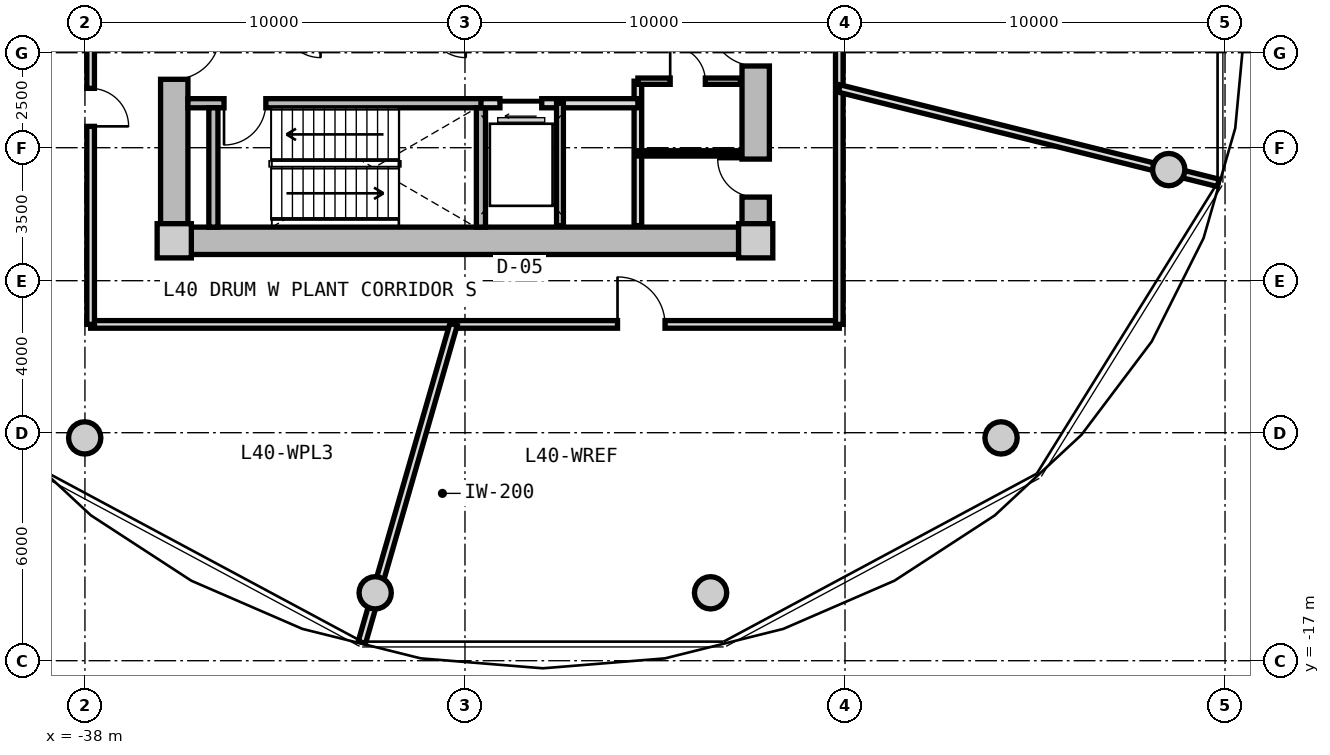
"""IFC4 building model, lengths in metres.
Left out: names, types, materials, properties, quantities, classifications, styles, units other than length and angle.
Written with IfcOpenShell. Run it as: python <this file> out.ifc"""

import sys

from ifc_helpers import new_model, si_unit, direction, frame, frame_2d, origin, origin_2d, place, context, subcontext, project, spatial, rectangle, circle, extrude, source, transform, mapped, element, fill, save


model = new_model("IFC4")
c1 = context("Model", 3, precision=1e-05, world=origin(), true_north=direction((0.0, 1.0)))
c2 = subcontext(c1, "Body", "Model", "MODEL_VIEW")
j1 = project(units=[si_unit("LENGTHUNIT", "METRE"), si_unit("PLANEANGLEUNIT", "RADIAN")], contexts=[c1])
p1 = place(None, origin())
s1 = spatial("IfcSite", under=j1, at=p1, CompositionType="ELEMENT")
p2 = place(p1, origin())
s2 = spatial("IfcBuilding", under=s1, at=p2, CompositionType="ELEMENT")
p3 = place(p2, frame((0.0, 0.0, 129.8)))
s3 = spatial("IfcBuildingStorey", under=s2, at=p3, CompositionType="ELEMENT", Elevation=129.8)
m1 = source(origin(), c2, "Body", "SweptSolid", [
    extrude(rectangle(XDim=0.9, YDim=0.9, at=origin_2d()), origin(), (0.0, 0.0, 1.0), 4.5),
])
for number, where, z_axis, x_axis in (
    (1, (-35.65, -5.95, 0.0), (0.0, 0.0, 1.0), (1.0, 0.0, 0.0)),
    (2, (-20.35, -5.95, 0.0), (0.0, 0.0, 1.0), (1.0, 0.0, 0.0)),
):
    element("IfcColumn", number, at=place(p3, frame(where, z_axis=z_axis, x_axis=x_axis)), inside=s3, PredefinedType="COLUMN", context=c2, shape_type="MappedRepresentation", body=[
        mapped(m1, transform((0.0, 0.0, 0.0), x_axis=(1.0, 0.0, 0.0), y_axis=(0.0, 1.0, 0.0), z_axis=(0.0, 0.0, 1.0), scale=1.0)),
    ])
m2 = source(origin(), c2, "Body", "SweptSolid", [
    extrude(rectangle(XDim=14.4, YDim=0.72, at=frame_2d((7.2, 0.0))), origin(), (0.0, 0.0, 1.0), 4.08),
])
p4 = place(p3, frame((-20.8, -5.95, 0.0), z_axis=(0.0, 0.0, 1.0), x_axis=(-1.0, 0.0, 0.0)))
e3 = element("IfcWall", 3, at=p4, inside=s3, PredefinedType="SHEAR", context=c2, shape_type="MappedRepresentation", body=[
    mapped(m2, transform((0.0, 0.0, 0.0), x_axis=(1.0, 0.0, 0.0), y_axis=(0.0, 1.0, 0.0), z_axis=(0.0, 0.0, 1.0), scale=1.0)),
])
m3 = source(origin(), c2, "Body", "SweptSolid", [
    extrude(rectangle(XDim=11.0, YDim=0.72, at=frame_2d((5.5, 0.0))), origin(), (0.0, 0.0, 1.0), 4.08),
])
p5 = place(p3, frame((-35.65, -5.5, 0.0), z_axis=(0.0, 0.0, 1.0), x_axis=(0.0, 1.0, 0.0)))
e4 = element("IfcWall", 4, at=p5, inside=s3, PredefinedType="SHEAR", context=c2, shape_type="MappedRepresentation", body=[
    mapped(m3, transform((0.0, 0.0, 0.0), x_axis=(1.0, 0.0, 0.0), y_axis=(0.0, 1.0, 0.0), z_axis=(0.0, 0.0, 1.0), scale=1.0)),
])
p6 = place(p5, frame((3.8, 0.0, 0.0)))
e5 = element("IfcOpeningElement", 5, at=p6, cuts=e4, PredefinedType="OPENING", context=c2, shape_type="SweptSolid", body=[
    extrude(rectangle(XDim=1.2, YDim=2.15, at=frame_2d((0.6, 1.075))), frame((0.0, 0.37, 0.0), z_axis=(0.0, -1.0, 0.0), x_axis=(1.0, 0.0, 0.0)), (0.0, 0.0, 1.0), 0.74),
])
p7 = place(p3, frame((-20.35, 5.5, 0.0), z_axis=(0.0, 0.0, 1.0), x_axis=(0.0, -1.0, 0.0)))
e6 = element("IfcWall", 6, at=p7, inside=s3, PredefinedType="SHEAR", context=c2, shape_type="MappedRepresentation", body=[
    mapped(m3, transform((0.0, 0.0, 0.0), x_axis=(1.0, 0.0, 0.0), y_axis=(0.0, 1.0, 0.0), z_axis=(0.0, 0.0, 1.0), scale=1.0)),
])
p8 = place(p7, frame((5.65, 0.0, 0.0)))
e7 = element("IfcOpeningElement", 7, at=p8, cuts=e6, PredefinedType="OPENING", context=c2, shape_type="SweptSolid", body=[
    extrude(rectangle(XDim=1.2, YDim=2.15, at=frame_2d((0.6, 1.075))), frame((0.0, 0.37, 0.0), z_axis=(0.0, -1.0, 0.0), x_axis=(1.0, 0.0, 0.0)), (0.0, 0.0, 1.0), 0.74),
])
p9 = place(p7, frame((9.3, 0.0, 0.0)))
e8 = element("IfcOpeningElement", 8, at=p9, cuts=e6, PredefinedType="OPENING", context=c2, shape_type="SweptSolid", body=[
    extrude(rectangle(XDim=1.0, YDim=2.1, at=frame_2d((0.5, 1.05))), frame((0.0, 0.37, 0.0), z_axis=(0.0, -1.0, 0.0), x_axis=(1.0, 0.0, 0.0)), (0.0, 0.0, 1.0), 0.74),
])
m4 = source(origin(), c2, "Body", "SweptSolid", [
    extrude(circle(Radius=0.425, at=origin_2d()), origin(), (0.0, 0.0, 1.0), 4.08),
])
for number, where, z_axis, x_axis in (
    (9, (-38.006, -11.137, 0.0), (0.0, 0.0, 1.0), (1.0, 0.0, 0.0)),
    (10, (-30.363, -15.213, 0.0), (0.0, 0.0, 1.0), (1.0, 0.0, 0.0)),
    (11, (-21.537, -15.213, 0.0), (0.0, 0.0, 1.0), (1.0, 0.0, 0.0)),
    (12, (-13.894, -11.137, 0.0), (0.0, 0.0, 1.0), (1.0, 0.0, 0.0)),
    (13, (-9.481, -4.076, 0.0), (0.0, 0.0, 1.0), (1.0, 0.0, 0.0)),
):
    element("IfcColumn", number, at=place(p3, frame(where, z_axis=z_axis, x_axis=x_axis)), inside=s3, PredefinedType="COLUMN", context=c2, shape_type="MappedRepresentation", body=[
        mapped(m4, transform((0.0, 0.0, 0.0), x_axis=(1.0, 0.0, 0.0), y_axis=(0.0, 1.0, 0.0), z_axis=(0.0, 0.0, 1.0), scale=1.0)),
    ])
m5 = source(origin(), c2, "Body", "SweptSolid", [
    extrude(rectangle(XDim=7.83, YDim=0.24, at=frame_2d((3.915, 0.0))), origin(), (0.0, 0.0, 1.0), 4.08),
])
p10 = place(p3, frame((-35.29, -2.33, 0.0), z_axis=(0.0, 0.0, 1.0), x_axis=(1.0, 0.0, 0.0)))
e14 = element("IfcWall", 14, at=p10, inside=s3, PredefinedType="PARTITIONING", context=c2, shape_type="MappedRepresentation", body=[
    mapped(m5, transform((0.0, 0.0, 0.0), x_axis=(1.0, 0.0, 0.0), y_axis=(0.0, 1.0, 0.0), z_axis=(0.0, 0.0, 1.0), scale=1.0)),
])
p11 = place(p10, frame((0.95, 0.0, 0.0)))
e15 = element("IfcOpeningElement", 15, at=p11, cuts=e14, PredefinedType="OPENING", context=c2, shape_type="SweptSolid", body=[
    extrude(rectangle(XDim=1.1, YDim=2.15, at=frame_2d((0.55, 1.075))), frame((0.0, 0.13, 0.0), z_axis=(0.0, -1.0, 0.0), x_axis=(1.0, 0.0, 0.0)), (0.0, 0.0, 1.0), 0.26),
])
m6 = source(origin(), c2, "Body", "SweptSolid", [
    extrude(rectangle(XDim=3.14, YDim=0.24, at=frame_2d((1.57, 0.0))), origin(), (0.0, 0.0, 1.0), 4.08),
])
for number, where, z_axis, x_axis in (
    (16, (-34.62, -5.59, 0.0), (0.0, 0.0, 1.0), (0.0, 1.0, 0.0)),
    (17, (-27.58, -5.59, 0.0), (0.0, 0.0, 1.0), (0.0, 1.0, 0.0)),
):
    element("IfcWall", number, at=place(p3, frame(where, z_axis=z_axis, x_axis=x_axis)), inside=s3, PredefinedType="PARTITIONING", context=c2, shape_type="MappedRepresentation", body=[
        mapped(m6, transform((0.0, 0.0, 0.0), x_axis=(1.0, 0.0, 0.0), y_axis=(0.0, 1.0, 0.0), z_axis=(0.0, 0.0, 1.0), scale=1.0)),
    ])
m7 = source(origin(), c2, "Body", "SweptSolid", [
    extrude(rectangle(XDim=3.8, YDim=0.2, at=frame_2d((1.9, 0.0))), origin(), (0.0, 0.0, 1.0), 4.065),
])
p12 = place(p3, frame((-23.45, -5.55, 0.0), z_axis=(0.0, 0.0, 1.0), x_axis=(0.0, 1.0, 0.0)))
e18 = element("IfcWall", 18, at=p12, inside=s3, PredefinedType="PARTITIONING", context=c2, shape_type="MappedRepresentation", body=[
    mapped(m7, transform((0.0, 0.0, 0.0), x_axis=(1.0, 0.0, 0.0), y_axis=(0.0, 1.0, 0.0), z_axis=(0.0, 0.0, 1.0), scale=1.0)),
])
m8 = source(origin(), c2, "Body", "SweptSolid", [
    extrude(rectangle(XDim=4.13, YDim=0.24, at=frame_2d((2.065, 0.0))), origin(), (0.0, 0.0, 1.0), 4.065),
])
p13 = place(p3, frame((-27.58, -2.33, 0.0), z_axis=(0.0, 0.0, 1.0), x_axis=(1.0, 0.0, 0.0)))
e19 = element("IfcWall", 19, at=p13, inside=s3, PredefinedType="PARTITIONING", context=c2, shape_type="MappedRepresentation", body=[
    mapped(m8, transform((0.0, 0.0, 0.0), x_axis=(1.0, 0.0, 0.0), y_axis=(0.0, 1.0, 0.0), z_axis=(0.0, 0.0, 1.0), scale=1.0)),
])
p14 = place(p13, frame((0.5, 0.0, 0.0)))
e20 = element("IfcOpeningElement", 20, at=p14, cuts=e19, PredefinedType="OPENING", context=c2, shape_type="SweptSolid", body=[
    extrude(rectangle(XDim=1.1, YDim=2.2, at=frame_2d((0.55, 1.1))), frame((0.0, 0.13, 0.0), z_axis=(0.0, -1.0, 0.0), x_axis=(1.0, 0.0, 0.0)), (0.0, 0.0, 1.0), 0.26),
])
m9 = source(origin(), c2, "Body", "SweptSolid", [
    extrude(rectangle(XDim=3.22, YDim=0.18, at=frame_2d((1.61, 0.0))), origin(), (0.0, 0.0, 1.0), 4.065),
])
p15 = place(p3, frame((-25.5, -5.55, 0.0), z_axis=(0.0, 0.0, 1.0), x_axis=(0.0, 1.0, 0.0)))
e21 = element("IfcWall", 21, at=p15, inside=s3, PredefinedType="PARTITIONING", context=c2, shape_type="MappedRepresentation", body=[
    mapped(m9, transform((0.0, 0.0, 0.0), x_axis=(1.0, 0.0, 0.0), y_axis=(0.0, 1.0, 0.0), z_axis=(0.0, 0.0, 1.0), scale=1.0)),
])
m10 = source(origin(), c2, "Body", "SweptSolid", [
    extrude(rectangle(XDim=2.7, YDim=0.165, at=frame_2d((1.35, 0.0))), origin(), (0.0, 0.0, 1.0), 4.065),
])
p16 = place(p3, frame((-23.45, -1.75, 0.0), z_axis=(0.0, 0.0, 1.0), x_axis=(1.0, 0.0, 0.0)))
e22 = element("IfcWall", 22, at=p16, inside=s3, PredefinedType="PARTITIONING", context=c2, shape_type="MappedRepresentation", body=[
    mapped(m10, transform((0.0, 0.0, 0.0), x_axis=(1.0, 0.0, 0.0), y_axis=(0.0, 1.0, 0.0), z_axis=(0.0, 0.0, 1.0), scale=1.0)),
])
p17 = place(p16, frame((0.85, 0.0, 0.0)))
e23 = element("IfcOpeningElement", 23, at=p17, cuts=e22, PredefinedType="OPENING", context=c2, shape_type="SweptSolid", body=[
    extrude(rectangle(XDim=0.925, YDim=2.1, at=frame_2d((0.462, 1.05))), frame((0.0, 0.093, 0.0), z_axis=(0.0, -1.0, 0.0), x_axis=(1.0, 0.0, 0.0)), (0.0, 0.0, 1.0), 0.185),
])
m11 = source(origin(), c2, "Body", "SweptSolid", [
    extrude(rectangle(XDim=2.7, YDim=0.14, at=frame_2d((1.35, 0.0))), origin(), (0.0, 0.0, 1.0), 4.065),
])
p18 = place(p3, frame((-23.45, -3.65, 0.0), z_axis=(0.0, 0.0, 1.0), x_axis=(1.0, 0.0, 0.0)))
e24 = element("IfcWall", 24, at=p18, inside=s3, PredefinedType="PARTITIONING", context=c2, shape_type="MappedRepresentation", body=[
    mapped(m11, transform((0.0, 0.0, 0.0), x_axis=(1.0, 0.0, 0.0), y_axis=(0.0, 1.0, 0.0), z_axis=(0.0, 0.0, 1.0), scale=1.0)),
])
m12 = source(origin(), c2, "Body", "SweptSolid", [
    extrude(rectangle(XDim=19.7, YDim=0.2, at=frame_2d((9.85, 0.0))), origin(), (0.0, 0.0, 1.0), 4.065),
])
p19 = place(p3, frame((-18.15, -8.15, 0.0), z_axis=(0.0, 0.0, 1.0), x_axis=(-1.0, 0.0, 0.0)))
e25 = element("IfcWall", 25, at=p19, inside=s3, PredefinedType="PARTITIONING", context=c2, shape_type="MappedRepresentation", body=[
    mapped(m12, transform((0.0, 0.0, 0.0), x_axis=(1.0, 0.0, 0.0), y_axis=(0.0, 1.0, 0.0), z_axis=(0.0, 0.0, 1.0), scale=1.0)),
])
p20 = place(p19, frame((4.586, 0.0, 0.0)))
e26 = element("IfcOpeningElement", 26, at=p20, cuts=e25, PredefinedType="OPENING", context=c2, shape_type="SweptSolid", body=[
    extrude(rectangle(XDim=1.25, YDim=2.2, at=frame_2d((0.625, 1.1))), frame((0.0, 0.11, 0.0), z_axis=(0.0, -1.0, 0.0), x_axis=(1.0, 0.0, 0.0)), (0.0, 0.0, 1.0), 0.22),
])
m13 = source(origin(), c2, "Body", "SweptSolid", [
    extrude(rectangle(XDim=16.3, YDim=0.2, at=frame_2d((8.15, 0.0))), origin(), (0.0, 0.0, 1.0), 4.065),
])
p21 = place(p3, frame((-37.85, -8.15, 0.0), z_axis=(0.0, 0.0, 1.0), x_axis=(0.0, 1.0, 0.0)))
e27 = element("IfcWall", 27, at=p21, inside=s3, PredefinedType="PARTITIONING", context=c2, shape_type="MappedRepresentation", body=[
    mapped(m13, transform((0.0, 0.0, 0.0), x_axis=(1.0, 0.0, 0.0), y_axis=(0.0, 1.0, 0.0), z_axis=(0.0, 0.0, 1.0), scale=1.0)),
])
p22 = place(p21, frame((5.211, 0.0, 0.0)))
e28 = element("IfcOpeningElement", 28, at=p22, cuts=e27, PredefinedType="OPENING", context=c2, shape_type="SweptSolid", body=[
    extrude(rectangle(XDim=1.0, YDim=2.1, at=frame_2d((0.5, 1.05))), frame((0.0, 0.11, 0.0), z_axis=(0.0, -1.0, 0.0), x_axis=(1.0, 0.0, 0.0)), (0.0, 0.0, 1.0), 0.22),
])
p23 = place(p3, frame((-18.15, 8.15, 0.0), z_axis=(0.0, 0.0, 1.0), x_axis=(0.0, -1.0, 0.0)))
e29 = element("IfcWall", 29, at=p23, inside=s3, PredefinedType="PARTITIONING", context=c2, shape_type="MappedRepresentation", body=[
    mapped(m13, transform((0.0, 0.0, 0.0), x_axis=(1.0, 0.0, 0.0), y_axis=(0.0, 1.0, 0.0), z_axis=(0.0, 0.0, 1.0), scale=1.0)),
])
p24 = place(p23, frame((4.697, 0.0, 0.0)))
e30 = element("IfcOpeningElement", 30, at=p24, cuts=e29, PredefinedType="OPENING", context=c2, shape_type="SweptSolid", body=[
    extrude(rectangle(XDim=1.0, YDim=2.1, at=frame_2d((0.5, 1.05))), frame((0.0, 0.11, 0.0), z_axis=(0.0, -1.0, 0.0), x_axis=(1.0, 0.0, 0.0)), (0.0, 0.0, 1.0), 0.22),
])
m14 = source(origin(), c2, "Body", "SweptSolid", [
    extrude(rectangle(XDim=8.708, YDim=0.2, at=frame_2d((4.354, 0.0))), origin(), (0.0, 0.0, 1.0), 4.065),
])
p25 = place(p3, frame((-28.3, -8.15, 0.0), z_axis=(0.0, 0.0, 1.0), x_axis=(-0.277019790717, -0.960864212858, 0.0)))
e31 = element("IfcWall", 31, at=p25, inside=s3, PredefinedType="PARTITIONING", context=c2, shape_type="MappedRepresentation", body=[
    mapped(m14, transform((0.0, 0.0, 0.0), x_axis=(1.0, 0.0, 0.0), y_axis=(0.0, 1.0, 0.0), z_axis=(0.0, 0.0, 1.0), scale=1.0)),
])
m15 = source(origin(), c2, "Body", "SweptSolid", [
    extrude(rectangle(XDim=10.277, YDim=0.2, at=frame_2d((5.139, 0.0))), origin(), (0.0, 0.0, 1.0), 4.065),
])
p26 = place(p3, frame((-18.15, -1.942, 0.0), z_axis=(0.0, 0.0, 1.0), x_axis=(0.970367056385, -0.241635626271, 0.0)))
e32 = element("IfcWall", 32, at=p26, inside=s3, PredefinedType="PARTITIONING", context=c2, shape_type="MappedRepresentation", body=[
    mapped(m15, transform((0.0, 0.0, 0.0), x_axis=(1.0, 0.0, 0.0), y_axis=(0.0, 1.0, 0.0), z_axis=(0.0, 0.0, 1.0), scale=1.0)),
])
m16 = source(origin(), c2, "Body", "SweptSolid", [
    extrude(rectangle(XDim=1.1, YDim=2.15, at=frame_2d((0.55, 1.075))), frame((0.0, 0.025, 0.0), z_axis=(0.0, -1.0, 0.0), x_axis=(1.0, 0.0, 0.0)), (0.0, 0.0, 1.0), 0.05),
])
p27 = place(p11, frame((1.1, 0.0, 0.0), z_axis=(0.0, 0.0, 1.0), x_axis=(-1.0, 0.0, 0.0)))
e33 = element("IfcDoor", 33, at=p27, inside=s3, OperationType="SINGLE_SWING_RIGHT", PredefinedType="DOOR", context=c2, shape_type="MappedRepresentation", body=[
    mapped(m16, transform((0.0, 0.0, 0.0), x_axis=(1.0, 0.0, 0.0), y_axis=(0.0, 1.0, 0.0), z_axis=(0.0, 0.0, 1.0), scale=1.0)),
])
fill(e15, e33)
m17 = source(origin(), c2, "Body", "SweptSolid", [
    extrude(rectangle(XDim=1.2, YDim=2.15, at=frame_2d((0.6, 1.075))), frame((0.0, 0.025, 0.0), z_axis=(0.0, -1.0, 0.0), x_axis=(1.0, 0.0, 0.0)), (0.0, 0.0, 1.0), 0.05),
])
p28 = place(p6, frame((1.2, 0.0, 0.0), z_axis=(0.0, 0.0, 1.0), x_axis=(-1.0, 0.0, 0.0)))
e34 = element("IfcDoor", 34, at=p28, inside=s3, OperationType="SINGLE_SWING_LEFT", PredefinedType="DOOR", context=c2, shape_type="MappedRepresentation", body=[
    mapped(m17, transform((0.0, 0.0, 0.0), x_axis=(1.0, 0.0, 0.0), y_axis=(0.0, 1.0, 0.0), z_axis=(0.0, 0.0, 1.0), scale=1.0)),
])
fill(e5, e34)
p29 = place(p8, frame((1.2, 0.0, 0.0), z_axis=(0.0, 0.0, 1.0), x_axis=(-1.0, 0.0, 0.0)))
e35 = element("IfcDoor", 35, at=p29, inside=s3, OperationType="SINGLE_SWING_RIGHT", PredefinedType="DOOR", context=c2, shape_type="MappedRepresentation", body=[
    mapped(m17, transform((0.0, 0.0, 0.0), x_axis=(1.0, 0.0, 0.0), y_axis=(0.0, 1.0, 0.0), z_axis=(0.0, 0.0, 1.0), scale=1.0)),
])
fill(e7, e35)
m18 = source(origin(), c2, "Body", "SweptSolid", [
    extrude(rectangle(XDim=1.1, YDim=2.2, at=frame_2d((0.55, 1.1))), frame((0.0, 0.025, 0.0), z_axis=(0.0, -1.0, 0.0), x_axis=(1.0, 0.0, 0.0)), (0.0, 0.0, 1.0), 0.05),
])
p30 = place(p14, frame((1.1, 0.0, 0.0), z_axis=(0.0, 0.0, 1.0), x_axis=(-1.0, 0.0, 0.0)))
e36 = element("IfcDoor", 36, at=p30, inside=s3, OperationType="SLIDING_TO_LEFT", PredefinedType="DOOR", context=c2, shape_type="MappedRepresentation", body=[
    mapped(m18, transform((0.0, 0.0, 0.0), x_axis=(1.0, 0.0, 0.0), y_axis=(0.0, 1.0, 0.0), z_axis=(0.0, 0.0, 1.0), scale=1.0)),
])
fill(e20, e36)
m19 = source(origin(), c2, "Body", "SweptSolid", [
    extrude(rectangle(XDim=0.925, YDim=2.1, at=frame_2d((0.462, 1.05))), frame((0.0, 0.025, 0.0), z_axis=(0.0, -1.0, 0.0), x_axis=(1.0, 0.0, 0.0)), (0.0, 0.0, 1.0), 0.05),
])
p31 = place(p17, origin())
e37 = element("IfcDoor", 37, at=p31, inside=s3, OperationType="SINGLE_SWING_LEFT", PredefinedType="DOOR", context=c2, shape_type="MappedRepresentation", body=[
    mapped(m19, transform((0.0, 0.0, 0.0), x_axis=(1.0, 0.0, 0.0), y_axis=(0.0, 1.0, 0.0), z_axis=(0.0, 0.0, 1.0), scale=1.0)),
])
fill(e23, e37)
m20 = source(origin(), c2, "Body", "SweptSolid", [
    extrude(rectangle(XDim=1.0, YDim=2.1, at=frame_2d((0.5, 1.05))), frame((0.0, 0.025, 0.0), z_axis=(0.0, -1.0, 0.0), x_axis=(1.0, 0.0, 0.0)), (0.0, 0.0, 1.0), 0.05),
])
p32 = place(p9, frame((1.0, 0.0, 0.0), z_axis=(0.0, 0.0, 1.0), x_axis=(-1.0, 0.0, 0.0)))
e38 = element("IfcDoor", 38, at=p32, inside=s3, OperationType="SINGLE_SWING_RIGHT", PredefinedType="DOOR", context=c2, shape_type="MappedRepresentation", body=[
    mapped(m20, transform((0.0, 0.0, 0.0), x_axis=(1.0, 0.0, 0.0), y_axis=(0.0, 1.0, 0.0), z_axis=(0.0, 0.0, 1.0), scale=1.0)),
])
fill(e8, e38)
m21 = source(origin(), c2, "Body", "SweptSolid", [
    extrude(rectangle(XDim=1.25, YDim=2.2, at=frame_2d((0.625, 1.1))), frame((0.0, 0.025, 0.0), z_axis=(0.0, -1.0, 0.0), x_axis=(1.0, 0.0, 0.0)), (0.0, 0.0, 1.0), 0.05),
])
p33 = place(p20, frame((1.25, 0.0, 0.0), z_axis=(0.0, 0.0, 1.0), x_axis=(-1.0, 0.0, 0.0)))
e39 = element("IfcDoor", 39, at=p33, inside=s3, OperationType="SINGLE_SWING_LEFT", PredefinedType="DOOR", context=c2, shape_type="MappedRepresentation", body=[
    mapped(m21, transform((0.0, 0.0, 0.0), x_axis=(1.0, 0.0, 0.0), y_axis=(0.0, 1.0, 0.0), z_axis=(0.0, 0.0, 1.0), scale=1.0)),
])
fill(e26, e39)
p34 = place(p22, frame((1.0, 0.0, 0.0), z_axis=(0.0, 0.0, 1.0), x_axis=(-1.0, 0.0, 0.0)))
e40 = element("IfcDoor", 40, at=p34, inside=s3, OperationType="SINGLE_SWING_RIGHT", PredefinedType="DOOR", context=c2, shape_type="MappedRepresentation", body=[
    mapped(m20, transform((0.0, 0.0, 0.0), x_axis=(1.0, 0.0, 0.0), y_axis=(0.0, 1.0, 0.0), z_axis=(0.0, 0.0, 1.0), scale=1.0)),
])
fill(e28, e40)
save(model, sys.argv[1])
